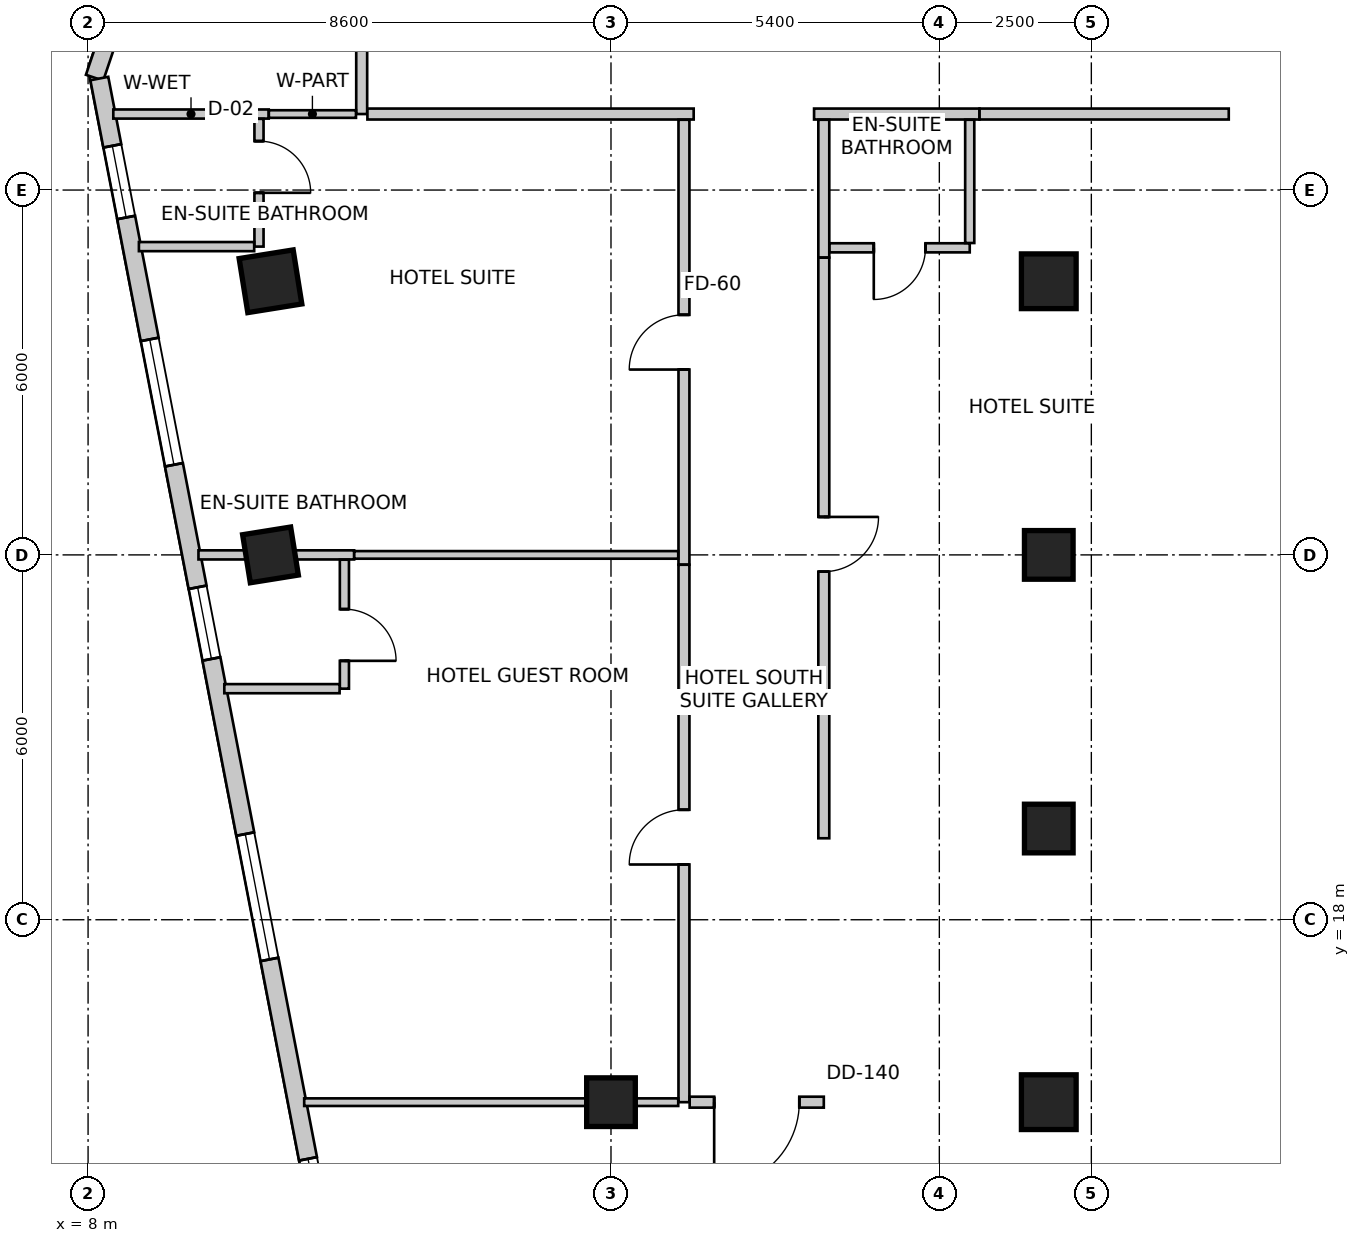
"""IFC4 building model, lengths in metres.
Left out: names, types, materials, properties, quantities, classifications, styles, units other than length and angle.
Written with IfcOpenShell. Run it as: python <this file> out.ifc"""

import sys

from ifc_helpers import new_model, si_unit, direction, frame, frame_2d, origin, origin_2d, place, context, subcontext, project, spatial, rectangle, extrude, source, transform, mapped, element, fill, save


model = new_model("IFC4")
c1 = context("Model", 3, precision=1e-05, world=origin(), true_north=direction((0.0, 1.0)))
c2 = subcontext(c1, "Body", "Model", "MODEL_VIEW")
j1 = project(units=[si_unit("LENGTHUNIT", "METRE"), si_unit("PLANEANGLEUNIT", "RADIAN")], contexts=[c1])
p1 = place(None, origin())
s1 = spatial("IfcSite", under=j1, at=p1, CompositionType="ELEMENT")
p2 = place(p1, origin())
s2 = spatial("IfcBuilding", under=s1, at=p2, CompositionType="ELEMENT")
p3 = place(p2, frame((0.0, 0.0, 132.2)))
s3 = spatial("IfcBuildingStorey", under=s2, at=p3, CompositionType="ELEMENT", Elevation=132.2)
m1 = source(origin(), c2, "Body", "SweptSolid", [
    extrude(rectangle(XDim=0.9, YDim=0.9, at=origin_2d()), origin(), (0.0, 0.0, 1.0), 3.6),
])
p4 = place(p3, frame((11.0, 28.5, 0.0), z_axis=(0.0, 0.0, 1.0), x_axis=(0.158158067254, -0.987413806751, 0.0)))
e1 = element("IfcColumn", 1, at=p4, inside=s3, PredefinedType="COLUMN", context=c2, shape_type="MappedRepresentation", body=[
    mapped(m1, transform((0.0, 0.0, 0.0), scale=1.0)),
])
m2 = source(origin(), c2, "Body", "SweptSolid", [
    extrude(rectangle(XDim=0.8, YDim=0.8, at=origin_2d()), origin(), (0.0, 0.0, 1.0), 3.6),
])
p5 = place(p3, frame((11.0, 24.0, 0.0), z_axis=(0.0, 0.0, 1.0), x_axis=(0.158158067254, -0.987413806751, 0.0)))
e2 = element("IfcColumn", 2, at=p5, inside=s3, PredefinedType="COLUMN", context=c2, shape_type="MappedRepresentation", body=[
    mapped(m2, transform((0.0, 0.0, 0.0), scale=1.0)),
])
p6 = place(p3, frame((23.8, 28.5, 0.0), z_axis=(0.0, 0.0, 1.0), x_axis=(1.0, 0.0, 0.0)))
e3 = element("IfcColumn", 3, at=p6, inside=s3, PredefinedType="COLUMN", context=c2, shape_type="MappedRepresentation", body=[
    mapped(m1, transform((0.0, 0.0, 0.0), scale=1.0)),
])
for number, where, z_axis, x_axis in (
    (4, (23.8, 24.0, 0.0), (0.0, 0.0, 1.0), (1.0, 0.0, 0.0)),
    (5, (23.8, 19.5, 0.0), (0.0, 0.0, 1.0), (1.0, 0.0, 0.0)),
):
    element("IfcColumn", number, at=place(p3, frame(where, z_axis=z_axis, x_axis=x_axis)), inside=s3, PredefinedType="COLUMN", context=c2, shape_type="MappedRepresentation", body=[
        mapped(m2, transform((0.0, 0.0, 0.0), scale=1.0)),
    ])
p7 = place(p3, frame((23.8, 15.0, 0.0), z_axis=(0.0, 0.0, 1.0), x_axis=(1.0, 0.0, 0.0)))
e6 = element("IfcColumn", 6, at=p7, inside=s3, PredefinedType="COLUMN", context=c2, shape_type="MappedRepresentation", body=[
    mapped(m1, transform((0.0, 0.0, 0.0), scale=1.0)),
])
p8 = place(p3, frame((16.6, 15.0, 0.0), z_axis=(0.0, 0.0, 1.0), x_axis=(1.0, 0.0, 0.0)))
e7 = element("IfcColumn", 7, at=p8, inside=s3, PredefinedType="COLUMN", context=c2, shape_type="MappedRepresentation", body=[
    mapped(m2, transform((0.0, 0.0, 0.0), scale=1.0)),
])
p9 = place(p3, frame((13.269, 47.134, 0.0), z_axis=(0.0, 0.0, 1.0), x_axis=(-0.319929596295, -0.947441319246, 0.0)))
e8 = element("IfcWall", 8, at=p9, inside=s3, PredefinedType="SOLIDWALL", context=c2, shape_type="SweptSolid", body=[
    extrude(rectangle(XDim=16.134, YDim=0.3, at=frame_2d((8.067, 0.0))), origin(), (0.0, 0.0, 1.0), 3.35),
])
m3 = source(origin(), c2, "Body", "SweptSolid", [
    extrude(rectangle(XDim=2.4, YDim=2.2, at=frame_2d((1.2, 1.1))), frame((0.0, 0.16, 0.0), z_axis=(0.0, -1.0, 0.0), x_axis=(1.0, 0.0, 0.0)), (0.0, 0.0, 1.0), 0.32),
])
p10 = place(p9, frame((2.276, 0.0, 0.85)))
e9 = element("IfcOpeningElement", 9, at=p10, cuts=e8, PredefinedType="OPENING", context=c2, shape_type="MappedRepresentation", body=[
    mapped(m3, transform((0.0, 0.0, 0.0), scale=1.0)),
])
m4 = source(origin(), c2, "Body", "SweptSolid", [
    extrude(rectangle(XDim=2.1, YDim=2.0, at=frame_2d((1.05, 1.0))), frame((0.0, 0.16, 0.0), z_axis=(0.0, -1.0, 0.0), x_axis=(1.0, 0.0, 0.0)), (0.0, 0.0, 1.0), 0.32),
])
p11 = place(p9, frame((7.361, 0.0, 0.85)))
e10 = element("IfcOpeningElement", 10, at=p11, cuts=e8, PredefinedType="OPENING", context=c2, shape_type="MappedRepresentation", body=[
    mapped(m4, transform((0.0, 0.0, 0.0), scale=1.0)),
])
p12 = place(p9, frame((12.147, 0.0, 0.85)))
e11 = element("IfcOpeningElement", 11, at=p12, cuts=e8, PredefinedType="OPENING", context=c2, shape_type="MappedRepresentation", body=[
    mapped(m3, transform((0.0, 0.0, 0.0), scale=1.0)),
])
p13 = place(p3, frame((8.185, 31.834, 0.0), z_axis=(0.0, 0.0, 1.0), x_axis=(0.189707113148, -0.981840725994, 0.0)))
e12 = element("IfcWall", 12, at=p13, inside=s3, PredefinedType="SOLIDWALL", context=c2, shape_type="SweptSolid", body=[
    extrude(rectangle(XDim=21.221, YDim=0.3, at=frame_2d((10.611, 0.0))), origin(), (0.0, 0.0, 1.0), 3.35),
])
m5 = source(origin(), c2, "Body", "SweptSolid", [
    extrude(rectangle(XDim=1.2, YDim=1.6, at=frame_2d((0.6, 0.8))), frame((0.0, 0.16, 0.0), z_axis=(0.0, -1.0, 0.0), x_axis=(1.0, 0.0, 0.0)), (0.0, 0.0, 1.0), 0.32),
])
p14 = place(p13, frame((1.127, 0.0, 0.85)))
e13 = element("IfcOpeningElement", 13, at=p14, cuts=e12, PredefinedType="OPENING", context=c2, shape_type="MappedRepresentation", body=[
    mapped(m5, transform((0.0, 0.0, 0.0), scale=1.0)),
])
p15 = place(p13, frame((4.369, 0.0, 0.85)))
e14 = element("IfcOpeningElement", 14, at=p15, cuts=e12, PredefinedType="OPENING", context=c2, shape_type="MappedRepresentation", body=[
    mapped(m4, transform((0.0, 0.0, 0.0), scale=1.0)),
])
p16 = place(p13, frame((8.521, 0.0, 0.85)))
e15 = element("IfcOpeningElement", 15, at=p16, cuts=e12, PredefinedType="OPENING", context=c2, shape_type="MappedRepresentation", body=[
    mapped(m5, transform((0.0, 0.0, 0.0), scale=1.0)),
])
p17 = place(p13, frame((12.654, 0.0, 0.85)))
e16 = element("IfcOpeningElement", 16, at=p17, cuts=e12, PredefinedType="OPENING", context=c2, shape_type="MappedRepresentation", body=[
    mapped(m4, transform((0.0, 0.0, 0.0), scale=1.0)),
])
p18 = place(p13, frame((18.094, 0.0, 0.85)))
e17 = element("IfcOpeningElement", 17, at=p18, cuts=e12, PredefinedType="OPENING", context=c2, shape_type="MappedRepresentation", body=[
    mapped(m4, transform((0.0, 0.0, 0.0), scale=1.0)),
])
p19 = place(p3, frame((12.5, 31.25, 0.0), z_axis=(0.0, 0.0, 1.0), x_axis=(0.0, 1.0, 0.0)))
e18 = element("IfcWall", 18, at=p19, inside=s3, PredefinedType="PARTITIONING", context=c2, shape_type="SweptSolid", body=[
    extrude(rectangle(XDim=2.2, YDim=0.18, at=frame_2d((1.1, 0.0))), origin(), (0.0, 0.0, 1.0), 3.034),
])
p20 = place(p3, frame((17.96, 31.25, 0.0), z_axis=(0.0, 0.0, 1.0), x_axis=(-1.0, 0.0, 0.0)))
e19 = element("IfcWall", 19, at=p20, inside=s3, PredefinedType="PARTITIONING", context=c2, shape_type="SweptSolid", body=[
    extrude(rectangle(XDim=5.366, YDim=0.18, at=frame_2d((2.683, 0.0))), origin(), (0.0, 0.0, 1.0), 3.034),
])
p21 = place(p3, frame((22.66, 31.25, 0.0), z_axis=(0.0, 0.0, 1.0), x_axis=(-1.0, 0.0, 0.0)))
e20 = element("IfcWall", 20, at=p21, inside=s3, PredefinedType="PARTITIONING", context=c2, shape_type="SweptSolid", body=[
    extrude(rectangle(XDim=2.72, YDim=0.18, at=frame_2d((1.36, 0.0))), origin(), (0.0, 0.0, 1.0), 3.034),
])
p22 = place(p3, frame((26.76, 31.25, 0.0), z_axis=(0.0, 0.0, 1.0), x_axis=(-1.0, 0.0, 0.0)))
e21 = element("IfcWall", 21, at=p22, inside=s3, PredefinedType="PARTITIONING", context=c2, shape_type="SweptSolid", body=[
    extrude(rectangle(XDim=4.098, YDim=0.18, at=frame_2d((2.049, 0.0))), origin(), (0.0, 0.0, 1.0), 3.35),
])
p23 = place(p3, frame((10.971, 31.25, 0.0), z_axis=(0.0, 0.0, 1.0), x_axis=(-1.0, 0.0, 0.0)))
e22 = element("IfcWall", 22, at=p23, inside=s3, PredefinedType="PARTITIONING", context=c2, shape_type="SweptSolid", body=[
    extrude(rectangle(XDim=2.556, YDim=0.15, at=frame_2d((1.278, 0.0))), origin(), (0.0, 0.0, 1.0), 2.492),
])
p24 = place(p3, frame((12.406, 31.25, 0.0), z_axis=(0.0, 0.0, 1.0), x_axis=(-1.0, 0.0, 0.0)))
e23 = element("IfcWall", 23, at=p24, inside=s3, PredefinedType="PARTITIONING", context=c2, shape_type="SweptSolid", body=[
    extrude(rectangle(XDim=1.433, YDim=0.125, at=frame_2d((0.717, 0.0))), origin(), (0.0, 0.0, 1.0), 2.492),
])
p25 = place(p3, frame((17.8, 23.84, 0.0), z_axis=(0.0, 0.0, 1.0), x_axis=(0.0, 1.0, 0.0)))
e24 = element("IfcWall", 24, at=p25, inside=s3, PredefinedType="PARTITIONING", context=c2, shape_type="SweptSolid", body=[
    extrude(rectangle(XDim=7.316, YDim=0.18, at=frame_2d((3.658, 0.0))), origin(), (0.0, 0.0, 1.0), 2.803),
])
m6 = source(origin(), c2, "Body", "SweptSolid", [
    extrude(rectangle(XDim=0.9, YDim=2.15, at=frame_2d((0.45, 1.075))), frame((0.0, 0.1, 0.0), z_axis=(0.0, -1.0, 0.0), x_axis=(1.0, 0.0, 0.0)), (0.0, 0.0, 1.0), 0.2),
])
p26 = place(p25, frame((3.208, 0.0, 0.0)))
e25 = element("IfcOpeningElement", 25, at=p26, cuts=e24, PredefinedType="OPENING", context=c2, shape_type="MappedRepresentation", body=[
    mapped(m6, transform((0.0, 0.0, 0.0), scale=1.0)),
])
p27 = place(p3, frame((17.8, 15.0, 0.0), z_axis=(0.0, 0.0, 1.0), x_axis=(0.0, 1.0, 0.0)))
e26 = element("IfcWall", 26, at=p27, inside=s3, PredefinedType="PARTITIONING", context=c2, shape_type="SweptSolid", body=[
    extrude(rectangle(XDim=8.838, YDim=0.18, at=frame_2d((4.419, 0.0))), origin(), (0.0, 0.0, 1.0), 2.492),
])
p28 = place(p27, frame((3.908, 0.0, 0.0)))
e27 = element("IfcOpeningElement", 27, at=p28, cuts=e26, PredefinedType="OPENING", context=c2, shape_type="MappedRepresentation", body=[
    mapped(m6, transform((0.0, 0.0, 0.0), scale=1.0)),
])
p29 = place(p3, frame((20.1, 31.156, 0.0), z_axis=(0.0, 0.0, 1.0), x_axis=(0.0, -1.0, 0.0)))
e28 = element("IfcWall", 28, at=p29, inside=s3, PredefinedType="PARTITIONING", context=c2, shape_type="SweptSolid", body=[
    extrude(rectangle(XDim=2.266, YDim=0.18, at=frame_2d((1.133, 0.0))), origin(), (0.0, 0.0, 1.0), 3.034),
])
p30 = place(p3, frame((20.1, 28.888, 0.0), z_axis=(0.0, 0.0, 1.0), x_axis=(0.0, -1.0, 0.0)))
e29 = element("IfcWall", 29, at=p30, inside=s3, PredefinedType="PARTITIONING", context=c2, shape_type="SweptSolid", body=[
    extrude(rectangle(XDim=9.548, YDim=0.18, at=frame_2d((4.774, 0.0))), origin(), (0.0, 0.0, 1.0), 2.803),
])
p31 = place(p30, frame((4.264, 0.0, 0.0)))
e30 = element("IfcOpeningElement", 30, at=p31, cuts=e29, PredefinedType="OPENING", context=c2, shape_type="MappedRepresentation", body=[
    mapped(m6, transform((0.0, 0.0, 0.0), scale=1.0)),
])
p32 = place(p3, frame((20.1, 15.0, 0.0), z_axis=(0.0, 0.0, 1.0), x_axis=(-1.0, 0.0, 0.0)))
e31 = element("IfcWall", 31, at=p32, inside=s3, PredefinedType="PARTITIONING", context=c2, shape_type="SweptSolid", body=[
    extrude(rectangle(XDim=2.206, YDim=0.18, at=frame_2d((1.103, 0.0))), origin(), (0.0, 0.0, 1.0), 2.492),
])
m7 = source(origin(), c2, "Body", "SweptSolid", [
    extrude(rectangle(XDim=1.4, YDim=2.15, at=frame_2d((0.7, 1.075))), frame((0.0, 0.1, 0.0), z_axis=(0.0, -1.0, 0.0), x_axis=(1.0, 0.0, 0.0)), (0.0, 0.0, 1.0), 0.2),
])
p33 = place(p32, frame((0.403, 0.0, 0.0)))
e32 = element("IfcOpeningElement", 32, at=p33, cuts=e31, PredefinedType="OPENING", context=c2, shape_type="MappedRepresentation", body=[
    mapped(m7, transform((0.0, 0.0, 0.0), scale=1.0)),
])
p34 = place(p3, frame((10.811, 31.171, 0.0), z_axis=(0.0, 0.0, 1.0), x_axis=(0.0, -1.0, 0.0)))
e33 = element("IfcWall", 33, at=p34, inside=s3, PredefinedType="PARTITIONING", context=c2, shape_type="SweptSolid", body=[
    extrude(rectangle(XDim=2.101, YDim=0.15, at=frame_2d((1.05, 0.0))), origin(), (0.0, 0.0, 1.0), 2.492),
])
m8 = source(origin(), c2, "Body", "SweptSolid", [
    extrude(rectangle(XDim=0.85, YDim=2.15, at=frame_2d((0.425, 1.075))), frame((0.0, 0.085, 0.0), z_axis=(0.0, -1.0, 0.0), x_axis=(1.0, 0.0, 0.0)), (0.0, 0.0, 1.0), 0.17),
])
p35 = place(p34, frame((0.366, 0.0, 0.0)))
e34 = element("IfcOpeningElement", 34, at=p35, cuts=e33, PredefinedType="OPENING", context=c2, shape_type="MappedRepresentation", body=[
    mapped(m8, transform((0.0, 0.0, 0.0), scale=1.0)),
])
p36 = place(p3, frame((10.732, 29.07, 0.0), z_axis=(0.0, 0.0, 1.0), x_axis=(-1.0, 0.0, 0.0)))
e35 = element("IfcWall", 35, at=p36, inside=s3, PredefinedType="PARTITIONING", context=c2, shape_type="SweptSolid", body=[
    extrude(rectangle(XDim=1.896, YDim=0.15, at=frame_2d((0.948, 0.0))), origin(), (0.0, 0.0, 1.0), 3.35),
])
p37 = place(p3, frame((12.375, 24.0, 0.0), z_axis=(0.0, 0.0, 1.0), x_axis=(-1.0, 0.0, 0.0)))
e36 = element("IfcWall", 36, at=p37, inside=s3, PredefinedType="PARTITIONING", context=c2, shape_type="SweptSolid", body=[
    extrude(rectangle(XDim=2.56, YDim=0.15, at=frame_2d((1.28, 0.0))), origin(), (0.0, 0.0, 1.0), 2.492),
])
p38 = place(p3, frame((17.706, 24.0, 0.0), z_axis=(0.0, 0.0, 1.0), x_axis=(-1.0, 0.0, 0.0)))
e37 = element("IfcWall", 37, at=p38, inside=s3, PredefinedType="PARTITIONING", context=c2, shape_type="SweptSolid", body=[
    extrude(rectangle(XDim=5.328, YDim=0.125, at=frame_2d((2.664, 0.0))), origin(), (0.0, 0.0, 1.0), 2.803),
])
p39 = place(p3, frame((12.216, 23.921, 0.0), z_axis=(0.0, 0.0, 1.0), x_axis=(0.0, -1.0, 0.0)))
e38 = element("IfcWall", 38, at=p39, inside=s3, PredefinedType="PARTITIONING", context=c2, shape_type="SweptSolid", body=[
    extrude(rectangle(XDim=2.121, YDim=0.15, at=frame_2d((1.061, 0.0))), origin(), (0.0, 0.0, 1.0), 2.922),
])
p40 = place(p39, frame((0.813, 0.0, 0.0)))
e39 = element("IfcOpeningElement", 39, at=p40, cuts=e38, PredefinedType="OPENING", context=c2, shape_type="MappedRepresentation", body=[
    mapped(m8, transform((0.0, 0.0, 0.0), scale=1.0)),
])
p41 = place(p3, frame((12.137, 21.8, 0.0), z_axis=(0.0, 0.0, 1.0), x_axis=(-1.0, 0.0, 0.0)))
e40 = element("IfcWall", 40, at=p41, inside=s3, PredefinedType="PARTITIONING", context=c2, shape_type="SweptSolid", body=[
    extrude(rectangle(XDim=1.896, YDim=0.15, at=frame_2d((0.948, 0.0))), origin(), (0.0, 0.0, 1.0), 3.35),
])
p42 = place(p3, frame((17.706, 15.0, 0.0), z_axis=(0.0, 0.0, 1.0), x_axis=(-1.0, 0.0, 0.0)))
e41 = element("IfcWall", 41, at=p42, inside=s3, PredefinedType="PARTITIONING", context=c2, shape_type="SweptSolid", body=[
    extrude(rectangle(XDim=6.152, YDim=0.125, at=frame_2d((3.076, 0.0))), origin(), (0.0, 0.0, 1.0), 2.492),
])
p43 = place(p3, frame((22.5, 29.05, 0.0), z_axis=(0.0, 0.0, 1.0), x_axis=(-1.0, 0.0, 0.0)))
e42 = element("IfcWall", 42, at=p43, inside=s3, PredefinedType="PARTITIONING", context=c2, shape_type="SweptSolid", body=[
    extrude(rectangle(XDim=2.306, YDim=0.15, at=frame_2d((1.153, 0.0))), origin(), (0.0, 0.0, 1.0), 3.034),
])
p44 = place(p43, frame((0.728, 0.0, 0.0)))
e43 = element("IfcOpeningElement", 43, at=p44, cuts=e42, PredefinedType="OPENING", context=c2, shape_type="MappedRepresentation", body=[
    mapped(m8, transform((0.0, 0.0, 0.0), scale=1.0)),
])
p45 = place(p3, frame((22.5, 31.156, 0.0), z_axis=(0.0, 0.0, 1.0), x_axis=(0.0, -1.0, 0.0)))
e44 = element("IfcWall", 44, at=p45, inside=s3, PredefinedType="PARTITIONING", context=c2, shape_type="SweptSolid", body=[
    extrude(rectangle(XDim=2.027, YDim=0.15, at=frame_2d((1.014, 0.0))), origin(), (0.0, 0.0, 1.0), 3.034),
])
m9 = source(origin(), c2, "Body", "SweptSolid", [
    extrude(rectangle(XDim=1.2, YDim=1.6, at=frame_2d((0.6, 0.8))), frame((0.0, -0.015, 0.0), z_axis=(0.0, -1.0, 0.0), x_axis=(1.0, 0.0, 0.0)), (0.0, 0.0, 1.0), 0.06),
])
p46 = place(p14, origin())
e45 = element("IfcWindow", 45, at=p46, inside=s3, PartitioningType="SINGLE_PANEL", PredefinedType="WINDOW", context=c2, shape_type="MappedRepresentation", body=[
    mapped(m9, transform((0.0, 0.0, 0.0), scale=1.0)),
])
fill(e13, e45)
m10 = source(origin(), c2, "Body", "SweptSolid", [
    extrude(rectangle(XDim=2.1, YDim=2.0, at=frame_2d((1.05, 1.0))), frame((0.0, -0.015, 0.0), z_axis=(0.0, -1.0, 0.0), x_axis=(1.0, 0.0, 0.0)), (0.0, 0.0, 1.0), 0.06),
])
p47 = place(p15, origin())
e46 = element("IfcWindow", 46, at=p47, inside=s3, PartitioningType="SINGLE_PANEL", PredefinedType="WINDOW", context=c2, shape_type="MappedRepresentation", body=[
    mapped(m10, transform((0.0, 0.0, 0.0), scale=1.0)),
])
fill(e14, e46)
p48 = place(p16, origin())
e47 = element("IfcWindow", 47, at=p48, inside=s3, PartitioningType="SINGLE_PANEL", PredefinedType="WINDOW", context=c2, shape_type="MappedRepresentation", body=[
    mapped(m9, transform((0.0, 0.0, 0.0), scale=1.0)),
])
fill(e15, e47)
p49 = place(p17, origin())
e48 = element("IfcWindow", 48, at=p49, inside=s3, PartitioningType="SINGLE_PANEL", PredefinedType="WINDOW", context=c2, shape_type="MappedRepresentation", body=[
    mapped(m10, transform((0.0, 0.0, 0.0), scale=1.0)),
])
fill(e16, e48)
p50 = place(p18, origin())
e49 = element("IfcWindow", 49, at=p50, inside=s3, PartitioningType="SINGLE_PANEL", PredefinedType="WINDOW", context=c2, shape_type="MappedRepresentation", body=[
    mapped(m10, transform((0.0, 0.0, 0.0), scale=1.0)),
])
fill(e17, e49)
m11 = source(origin(), c2, "Body", "SweptSolid", [
    extrude(rectangle(XDim=0.85, YDim=2.15, at=frame_2d((0.425, 1.075))), frame((0.0, 0.025, 0.0), z_axis=(0.0, -1.0, 0.0), x_axis=(1.0, 0.0, 0.0)), (0.0, 0.0, 1.0), 0.05),
])
p51 = place(p35, origin())
e50 = element("IfcDoor", 50, at=p51, inside=s3, OperationType="SINGLE_SWING_RIGHT", PredefinedType="DOOR", context=c2, shape_type="MappedRepresentation", body=[
    mapped(m11, transform((0.0, 0.0, 0.0), scale=1.0)),
])
fill(e34, e50)
m12 = source(origin(), c2, "Body", "SweptSolid", [
    extrude(rectangle(XDim=0.9, YDim=2.15, at=frame_2d((0.45, 1.075))), frame((0.0, 0.025, 0.0), z_axis=(0.0, -1.0, 0.0), x_axis=(1.0, 0.0, 0.0)), (0.0, 0.0, 1.0), 0.05),
])
p52 = place(p26, origin())
e51 = element("IfcDoor", 51, at=p52, inside=s3, OperationType="SINGLE_SWING_LEFT", PredefinedType="DOOR", context=c2, shape_type="MappedRepresentation", body=[
    mapped(m12, transform((0.0, 0.0, 0.0), scale=1.0)),
])
fill(e25, e51)
p53 = place(p40, origin())
e52 = element("IfcDoor", 52, at=p53, inside=s3, OperationType="SINGLE_SWING_RIGHT", PredefinedType="DOOR", context=c2, shape_type="MappedRepresentation", body=[
    mapped(m11, transform((0.0, 0.0, 0.0), scale=1.0)),
])
fill(e39, e52)
p54 = place(p28, origin())
e53 = element("IfcDoor", 53, at=p54, inside=s3, OperationType="SINGLE_SWING_LEFT", PredefinedType="DOOR", context=c2, shape_type="MappedRepresentation", body=[
    mapped(m12, transform((0.0, 0.0, 0.0), scale=1.0)),
])
fill(e27, e53)
p55 = place(p44, origin())
e54 = element("IfcDoor", 54, at=p55, inside=s3, OperationType="SINGLE_SWING_RIGHT", PredefinedType="DOOR", context=c2, shape_type="MappedRepresentation", body=[
    mapped(m11, transform((0.0, 0.0, 0.0), scale=1.0)),
])
fill(e43, e54)
p56 = place(p31, origin())
e55 = element("IfcDoor", 55, at=p56, inside=s3, OperationType="SINGLE_SWING_LEFT", PredefinedType="DOOR", context=c2, shape_type="MappedRepresentation", body=[
    mapped(m12, transform((0.0, 0.0, 0.0), scale=1.0)),
])
fill(e30, e55)
m13 = source(origin(), c2, "Body", "SweptSolid", [
    extrude(rectangle(XDim=1.4, YDim=2.15, at=frame_2d((0.7, 1.075))), frame((0.0, 0.025, 0.0), z_axis=(0.0, -1.0, 0.0), x_axis=(1.0, 0.0, 0.0)), (0.0, 0.0, 1.0), 0.05),
])
p57 = place(p33, origin())
e56 = element("IfcDoor", 56, at=p57, inside=s3, OperationType="SINGLE_SWING_RIGHT", PredefinedType="DOOR", context=c2, shape_type="MappedRepresentation", body=[
    mapped(m13, transform((0.0, 0.0, 0.0), scale=1.0)),
])
fill(e32, e56)
save(model, sys.argv[1])
